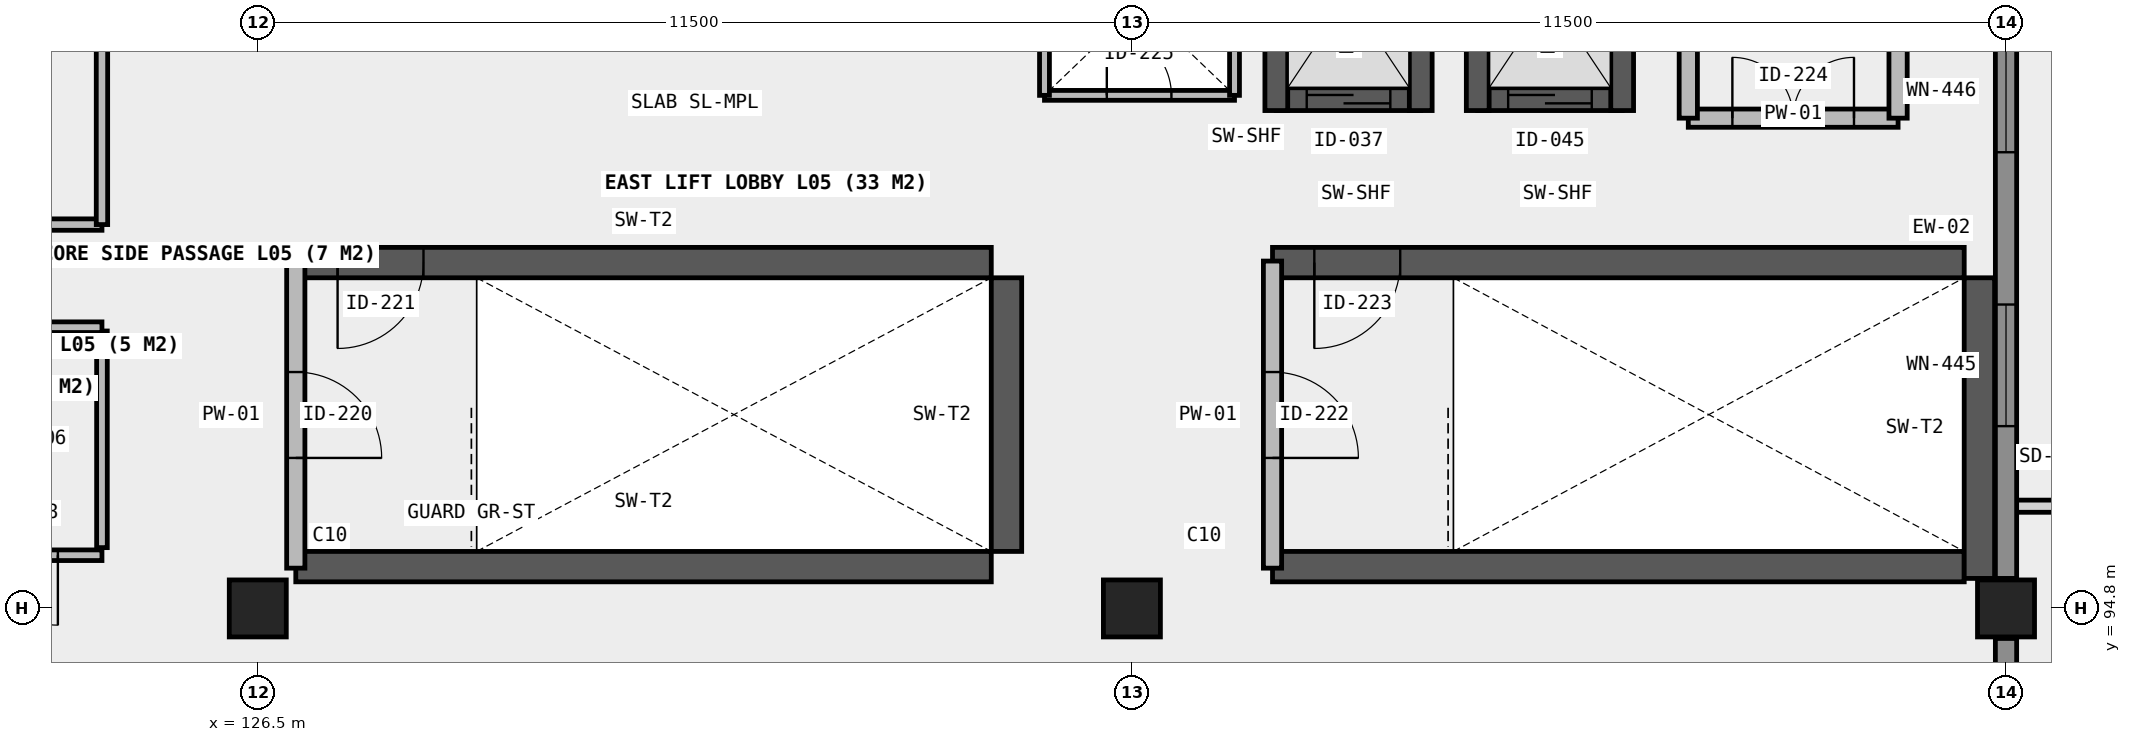
"""IFC4 building model, lengths in metres.
Left out: names, types, materials, properties, quantities, classifications, styles, units other than length and angle.
Written with IfcOpenShell. Run it as: python <this file> out.ifc"""

import sys

from ifc_helpers import new_model, si_unit, direction, frame, frame_2d, origin, origin_2d, place, context, subcontext, project, spatial, rectangle, circle, extrude, element, fill, save


model = new_model("IFC4")
c1 = context("Model", 3, precision=1e-05, world=origin(), true_north=direction((0.0, 1.0)))
c2 = subcontext(c1, "Body", "Model", "MODEL_VIEW")
j1 = project(units=[si_unit("LENGTHUNIT", "METRE"), si_unit("PLANEANGLEUNIT", "RADIAN")], contexts=[c1])
p1 = place(None, origin())
s1 = spatial("IfcSite", under=j1, at=p1, CompositionType="ELEMENT")
p2 = place(p1, origin())
s2 = spatial("IfcBuilding", under=s1, at=p2, CompositionType="ELEMENT")
p3 = place(p2, frame((0.0, 0.0, 22.46)))
s3 = spatial("IfcBuildingStorey", under=s2, at=p3, CompositionType="ELEMENT", Elevation=22.46)
for number, where, z_axis, x_axis in (
    (1, (126.5, 94.8, 0.0), (0.0, 0.0, 1.0), (1.0, 0.0, 0.0)),
    (2, (138.0, 94.8, 0.0), (0.0, 0.0, 1.0), (1.0, 0.0, 0.0)),
    (3, (149.5, 94.8, 0.0), (0.0, 0.0, 1.0), (1.0, 0.0, 0.0)),
):
    element("IfcColumn", number, at=place(p3, frame(where, z_axis=z_axis, x_axis=x_axis)), inside=s3, PredefinedType="COLUMN", context=c2, shape_type="SweptSolid", body=[
        extrude(circle(Radius=0.375, at=origin_2d()), origin(), (0.0, 0.0, 1.0), 4.44),
    ])
p4 = place(p3, frame((139.9, 101.5, 0.0), z_axis=(0.0, 0.0, 1.0), x_axis=(1.0, 0.0, 0.0)))
e4 = element("IfcWall", 4, at=p4, inside=s3, PredefinedType="SHEAR", context=c2, shape_type="SweptSolid", body=[
    extrude(rectangle(XDim=1.9, YDim=0.3, at=frame_2d((0.95, 0.0))), origin(), (0.0, 0.0, 1.0), 4.16),
])
p5 = place(p4, frame((0.4, 0.0, 0.0)))
e5 = element("IfcOpeningElement", 5, at=p5, cuts=e4, PredefinedType="OPENING", context=c2, shape_type="SweptSolid", body=[
    extrude(rectangle(XDim=1.1, YDim=2.15, at=frame_2d((0.55, 1.075))), frame((0.0, 0.16, 0.0), z_axis=(0.0, -1.0, 0.0), x_axis=(1.0, 0.0, 0.0)), (0.0, 0.0, 1.0), 0.32),
])
for number, where, z_axis, x_axis in (
    (6, (139.9, 101.35, 0.0), (0.0, 0.0, 1.0), (0.0, 1.0, 0.0)),
    (7, (141.8, 101.35, 0.0), (0.0, 0.0, 1.0), (0.0, 1.0, 0.0)),
):
    element("IfcWall", number, at=place(p3, frame(where, z_axis=z_axis, x_axis=x_axis)), inside=s3, PredefinedType="SHEAR", context=c2, shape_type="SweptSolid", body=[
        extrude(rectangle(XDim=3.0, YDim=0.3, at=frame_2d((1.5, 0.0))), origin(), (0.0, 0.0, 1.0), 4.16),
    ])
p6 = place(p3, frame((142.55, 101.5, 0.0), z_axis=(0.0, 0.0, 1.0), x_axis=(1.0, 0.0, 0.0)))
e8 = element("IfcWall", 8, at=p6, inside=s3, PredefinedType="SHEAR", context=c2, shape_type="SweptSolid", body=[
    extrude(rectangle(XDim=1.9, YDim=0.3, at=frame_2d((0.95, 0.0))), origin(), (0.0, 0.0, 1.0), 4.16),
])
p7 = place(p6, frame((0.4, 0.0, 0.0)))
e9 = element("IfcOpeningElement", 9, at=p7, cuts=e8, PredefinedType="OPENING", context=c2, shape_type="SweptSolid", body=[
    extrude(rectangle(XDim=1.1, YDim=2.15, at=frame_2d((0.55, 1.075))), frame((0.0, 0.16, 0.0), z_axis=(0.0, -1.0, 0.0), x_axis=(1.0, 0.0, 0.0)), (0.0, 0.0, 1.0), 0.32),
])
for number, where, z_axis, x_axis in (
    (10, (142.55, 101.35, 0.0), (0.0, 0.0, 1.0), (0.0, 1.0, 0.0)),
    (11, (144.45, 101.35, 0.0), (0.0, 0.0, 1.0), (0.0, 1.0, 0.0)),
):
    element("IfcWall", number, at=place(p3, frame(where, z_axis=z_axis, x_axis=x_axis)), inside=s3, PredefinedType="SHEAR", context=c2, shape_type="SweptSolid", body=[
        extrude(rectangle(XDim=3.0, YDim=0.3, at=frame_2d((1.5, 0.0))), origin(), (0.0, 0.0, 1.0), 4.16),
    ])
p8 = place(p3, frame((127.0, 95.35, 0.0), z_axis=(0.0, 0.0, 1.0), x_axis=(1.0, 0.0, 0.0)))
e12 = element("IfcWall", 12, at=p8, inside=s3, PredefinedType="SHEAR", context=c2, shape_type="SweptSolid", body=[
    extrude(rectangle(XDim=9.15, YDim=0.4, at=frame_2d((4.575, 0.0))), origin(), (0.0, 0.0, 1.0), 4.44),
])
p9 = place(p3, frame((127.0, 99.35, 0.0), z_axis=(0.0, 0.0, 1.0), x_axis=(1.0, 0.0, 0.0)))
e13 = element("IfcWall", 13, at=p9, inside=s3, PredefinedType="SHEAR", context=c2, shape_type="SweptSolid", body=[
    extrude(rectangle(XDim=9.15, YDim=0.4, at=frame_2d((4.575, 0.0))), origin(), (0.0, 0.0, 1.0), 4.44),
])
p10 = place(p9, frame((0.55, 0.0, 0.0)))
e14 = element("IfcOpeningElement", 14, at=p10, cuts=e13, PredefinedType="OPENING", context=c2, shape_type="SweptSolid", body=[
    extrude(rectangle(XDim=1.13, YDim=2.15, at=frame_2d((0.565, 1.075))), frame((0.0, 0.21, 0.0), z_axis=(0.0, -1.0, 0.0), x_axis=(1.0, 0.0, 0.0)), (0.0, 0.0, 1.0), 0.42),
])
p11 = place(p3, frame((136.35, 95.55, 0.0), z_axis=(0.0, 0.0, 1.0), x_axis=(0.0, 1.0, 0.0)))
e15 = element("IfcWall", 15, at=p11, inside=s3, PredefinedType="SHEAR", context=c2, shape_type="SweptSolid", body=[
    extrude(rectangle(XDim=3.6, YDim=0.4, at=frame_2d((1.8, 0.0))), origin(), (0.0, 0.0, 1.0), 4.44),
])
p12 = place(p3, frame((139.85, 95.35, 0.0), z_axis=(0.0, 0.0, 1.0), x_axis=(1.0, 0.0, 0.0)))
e16 = element("IfcWall", 16, at=p12, inside=s3, PredefinedType="SHEAR", context=c2, shape_type="SweptSolid", body=[
    extrude(rectangle(XDim=9.1, YDim=0.4, at=frame_2d((4.55, 0.0))), origin(), (0.0, 0.0, 1.0), 4.44),
])
p13 = place(p3, frame((139.85, 99.35, 0.0), z_axis=(0.0, 0.0, 1.0), x_axis=(1.0, 0.0, 0.0)))
e17 = element("IfcWall", 17, at=p13, inside=s3, PredefinedType="SHEAR", context=c2, shape_type="SweptSolid", body=[
    extrude(rectangle(XDim=9.1, YDim=0.4, at=frame_2d((4.55, 0.0))), origin(), (0.0, 0.0, 1.0), 4.44),
])
p14 = place(p13, frame((0.55, 0.0, 0.0)))
e18 = element("IfcOpeningElement", 18, at=p14, cuts=e17, PredefinedType="OPENING", context=c2, shape_type="SweptSolid", body=[
    extrude(rectangle(XDim=1.13, YDim=2.15, at=frame_2d((0.565, 1.075))), frame((0.0, 0.21, 0.0), z_axis=(0.0, -1.0, 0.0), x_axis=(1.0, 0.0, 0.0)), (0.0, 0.0, 1.0), 0.42),
])
p15 = place(p3, frame((149.15, 95.195, 0.0), z_axis=(0.0, 0.0, 1.0), x_axis=(0.0, 1.0, 0.0)))
e19 = element("IfcWall", 19, at=p15, inside=s3, PredefinedType="SHEAR", context=c2, shape_type="SweptSolid", body=[
    extrude(rectangle(XDim=3.955, YDim=0.4, at=frame_2d((1.978, 0.0))), origin(), (0.0, 0.0, 1.0), 4.44),
])
p16 = place(p3, frame((149.5, 86.27, 0.0), z_axis=(0.0, 0.0, 1.0), x_axis=(0.0, 1.0, 0.0)))
e20 = element("IfcWall", 20, at=p16, inside=s3, PredefinedType="SOLIDWALL", context=c2, shape_type="SweptSolid", body=[
    extrude(rectangle(XDim=8.135, YDim=0.28, at=frame_2d((4.067, 0.0))), origin(), (0.0, 0.0, 1.0), 3.36),
])
p17 = place(p16, frame((3.167, 0.0, 0.0)))
e21 = element("IfcOpeningElement", 21, at=p17, cuts=e20, PredefinedType="OPENING", context=c2, shape_type="SweptSolid", body=[
    extrude(rectangle(XDim=1.8, YDim=2.25, at=frame_2d((0.9, 1.125))), frame((0.0, 0.15, 0.0), z_axis=(0.0, -1.0, 0.0), x_axis=(1.0, 0.0, 0.0)), (0.0, 0.0, 1.0), 0.3),
])
p18 = place(p16, frame((0.784, 0.0, 0.78)))
e22 = element("IfcOpeningElement", 22, at=p18, cuts=e20, PredefinedType="OPENING", context=c2, shape_type="SweptSolid", body=[
    extrude(rectangle(XDim=1.6, YDim=1.6, at=frame_2d((0.8, 0.8))), frame((0.0, 0.15, 0.0), z_axis=(0.0, -1.0, 0.0), x_axis=(1.0, 0.0, 0.0)), (0.0, 0.0, 1.0), 0.3),
])
p19 = place(p3, frame((149.5, 95.195, 0.0), z_axis=(0.0, 0.0, 1.0), x_axis=(0.0, 1.0, 0.0)))
e23 = element("IfcWall", 23, at=p19, inside=s3, PredefinedType="SOLIDWALL", context=c2, shape_type="SweptSolid", body=[
    extrude(rectangle(XDim=9.21, YDim=0.28, at=frame_2d((4.605, 0.0))), origin(), (0.0, 0.0, 1.0), 3.36),
])
p20 = place(p19, frame((2.003, 0.0, 0.85)))
e24 = element("IfcOpeningElement", 24, at=p20, cuts=e23, PredefinedType="OPENING", context=c2, shape_type="SweptSolid", body=[
    extrude(rectangle(XDim=1.6, YDim=1.6, at=frame_2d((0.8, 0.8))), frame((0.0, 0.15, 0.0), z_axis=(0.0, -1.0, 0.0), x_axis=(1.0, 0.0, 0.0)), (0.0, 0.0, 1.0), 0.3),
])
p21 = place(p19, frame((5.607, 0.0, 0.85)))
e25 = element("IfcOpeningElement", 25, at=p21, cuts=e23, PredefinedType="OPENING", context=c2, shape_type="SweptSolid", body=[
    extrude(rectangle(XDim=1.6, YDim=1.6, at=frame_2d((0.8, 0.8))), frame((0.0, 0.15, 0.0), z_axis=(0.0, -1.0, 0.0), x_axis=(1.0, 0.0, 0.0)), (0.0, 0.0, 1.0), 0.3),
])
p22 = place(p3, frame((127.0, 95.33, 0.0), z_axis=(0.0, 0.0, 1.0), x_axis=(0.0, 1.0, 0.0)))
e26 = element("IfcWall", 26, at=p22, inside=s3, PredefinedType="SOLIDWALL", context=c2, shape_type="SweptSolid", body=[
    extrude(rectangle(XDim=4.04, YDim=0.24, at=frame_2d((2.02, 0.0))), origin(), (0.0, 0.0, 1.0), 4.14),
])
p23 = place(p22, frame((1.45, 0.0, 0.0)))
e27 = element("IfcOpeningElement", 27, at=p23, cuts=e26, PredefinedType="OPENING", context=c2, shape_type="SweptSolid", body=[
    extrude(rectangle(XDim=1.13, YDim=2.15, at=frame_2d((0.565, 1.075))), frame((0.0, 0.13, 0.0), z_axis=(0.0, -1.0, 0.0), x_axis=(1.0, 0.0, 0.0)), (0.0, 0.0, 1.0), 0.26),
])
p24 = place(p3, frame((139.85, 95.33, 0.0), z_axis=(0.0, 0.0, 1.0), x_axis=(0.0, 1.0, 0.0)))
e28 = element("IfcWall", 28, at=p24, inside=s3, PredefinedType="SOLIDWALL", context=c2, shape_type="SweptSolid", body=[
    extrude(rectangle(XDim=4.04, YDim=0.24, at=frame_2d((2.02, 0.0))), origin(), (0.0, 0.0, 1.0), 4.14),
])
p25 = place(p24, frame((1.45, 0.0, 0.0)))
e29 = element("IfcOpeningElement", 29, at=p25, cuts=e28, PredefinedType="OPENING", context=c2, shape_type="SweptSolid", body=[
    extrude(rectangle(XDim=1.13, YDim=2.15, at=frame_2d((0.565, 1.075))), frame((0.0, 0.13, 0.0), z_axis=(0.0, -1.0, 0.0), x_axis=(1.0, 0.0, 0.0)), (0.0, 0.0, 1.0), 0.26),
])
p26 = place(p3, frame((145.32, 101.25, 0.0), z_axis=(0.0, 0.0, 1.0), x_axis=(1.0, 0.0, 0.0)))
e30 = element("IfcWall", 30, at=p26, inside=s3, PredefinedType="SOLIDWALL", context=c2, shape_type="SweptSolid", body=[
    extrude(rectangle(XDim=2.76, YDim=0.24, at=frame_2d((1.38, 0.0))), origin(), (0.0, 0.0, 1.0), 4.14),
])
p27 = place(p26, frame((0.58, 0.0, 0.0)))
e31 = element("IfcOpeningElement", 31, at=p27, cuts=e30, PredefinedType="OPENING", context=c2, shape_type="SweptSolid", body=[
    extrude(rectangle(XDim=1.6, YDim=2.15, at=frame_2d((0.8, 1.075))), frame((0.0, 0.13, 0.0), z_axis=(0.0, -1.0, 0.0), x_axis=(1.0, 0.0, 0.0)), (0.0, 0.0, 1.0), 0.26),
])
for number, where, z_axis, x_axis in (
    (32, (145.32, 101.25, 0.0), (0.0, 0.0, 1.0), (0.0, 1.0, 0.0)),
    (33, (148.08, 101.25, 0.0), (0.0, 0.0, 1.0), (0.0, 1.0, 0.0)),
):
    element("IfcWall", number, at=place(p3, frame(where, z_axis=z_axis, x_axis=x_axis)), inside=s3, PredefinedType="SOLIDWALL", context=c2, shape_type="SweptSolid", body=[
        extrude(rectangle(XDim=2.6, YDim=0.24, at=frame_2d((1.3, 0.0))), origin(), (0.0, 0.0, 1.0), 4.14),
    ])
p28 = place(p3, frame((136.85, 101.55, 0.0), z_axis=(0.0, 0.0, 1.0), x_axis=(1.0, 0.0, 0.0)))
e34 = element("IfcWall", 34, at=p28, inside=s3, PredefinedType="PLUMBINGWALL", context=c2, shape_type="SweptSolid", body=[
    extrude(rectangle(XDim=2.5, YDim=0.13, at=frame_2d((1.25, 0.0))), origin(), (0.0, 0.0, 1.0), 4.14),
])
p29 = place(p28, frame((0.82, 0.0, 0.0)))
e35 = element("IfcOpeningElement", 35, at=p29, cuts=e34, PredefinedType="OPENING", context=c2, shape_type="SweptSolid", body=[
    extrude(rectangle(XDim=0.85, YDim=2.0, at=frame_2d((0.425, 1.0))), frame((0.0, 0.075, 0.0), z_axis=(0.0, -1.0, 0.0), x_axis=(1.0, 0.0, 0.0)), (0.0, 0.0, 1.0), 0.15),
])
for number, where, z_axis, x_axis in (
    (36, (136.85, 101.55, 0.0), (0.0, 0.0, 1.0), (0.0, 1.0, 0.0)),
    (37, (139.35, 101.55, 0.0), (0.0, 0.0, 1.0), (0.0, 1.0, 0.0)),
):
    element("IfcWall", number, at=place(p3, frame(where, z_axis=z_axis, x_axis=x_axis)), inside=s3, PredefinedType="PLUMBINGWALL", context=c2, shape_type="SweptSolid", body=[
        extrude(rectangle(XDim=2.4, YDim=0.13, at=frame_2d((1.2, 0.0))), origin(), (0.0, 0.0, 1.0), 4.14),
    ])
p30 = place(p3, frame((118.15, 95.5, 0.0), z_axis=(0.0, 0.0, 1.0), x_axis=(1.0, 0.0, 0.0)))
e38 = element("IfcWall", 38, at=p30, inside=s3, PredefinedType="PLUMBINGWALL", context=c2, shape_type="SweptSolid", body=[
    extrude(rectangle(XDim=6.3, YDim=0.14, at=frame_2d((3.15, 0.0))), origin(), (0.0, 0.0, 1.0), 4.14),
])
p31 = place(p30, frame((0.72, 0.0, 0.0)))
e39 = element("IfcOpeningElement", 39, at=p31, cuts=e38, PredefinedType="OPENING", context=c2, shape_type="SweptSolid", body=[
    extrude(rectangle(XDim=0.95, YDim=2.1, at=frame_2d((0.475, 1.05))), frame((0.0, 0.08, 0.0), z_axis=(0.0, -1.0, 0.0), x_axis=(1.0, 0.0, 0.0)), (0.0, 0.0, 1.0), 0.16),
])
p32 = place(p30, frame((2.8, 0.0, 0.0)))
e40 = element("IfcOpeningElement", 40, at=p32, cuts=e38, PredefinedType="OPENING", context=c2, shape_type="SweptSolid", body=[
    extrude(rectangle(XDim=0.92, YDim=2.1, at=frame_2d((0.46, 1.05))), frame((0.0, 0.08, 0.0), z_axis=(0.0, -1.0, 0.0), x_axis=(1.0, 0.0, 0.0)), (0.0, 0.0, 1.0), 0.16),
])
p33 = place(p30, frame((4.8, 0.0, 0.0)))
e41 = element("IfcOpeningElement", 41, at=p33, cuts=e38, PredefinedType="OPENING", context=c2, shape_type="SweptSolid", body=[
    extrude(rectangle(XDim=0.92, YDim=2.1, at=frame_2d((0.46, 1.05))), frame((0.0, 0.08, 0.0), z_axis=(0.0, -1.0, 0.0), x_axis=(1.0, 0.0, 0.0)), (0.0, 0.0, 1.0), 0.16),
])
p34 = place(p3, frame((124.45, 95.6, 0.0), z_axis=(0.0, 0.0, 1.0), x_axis=(0.0, 1.0, 0.0)))
e42 = element("IfcWall", 42, at=p34, inside=s3, PredefinedType="PLUMBINGWALL", context=c2, shape_type="SweptSolid", body=[
    extrude(rectangle(XDim=2.85, YDim=0.14, at=frame_2d((1.425, 0.0))), origin(), (0.0, 0.0, 1.0), 4.14),
])
p35 = place(p3, frame((118.15, 98.5, 0.0), z_axis=(0.0, 0.0, 1.0), x_axis=(1.0, 0.0, 0.0)))
e43 = element("IfcWall", 43, at=p35, inside=s3, PredefinedType="PLUMBINGWALL", context=c2, shape_type="SweptSolid", body=[
    extrude(rectangle(XDim=6.3, YDim=0.14, at=frame_2d((3.15, 0.0))), origin(), (0.0, 0.0, 1.0), 4.14),
])
p36 = place(p3, frame((115.16, 99.85, 0.0), z_axis=(0.0, 0.0, 1.0), x_axis=(1.0, 0.0, 0.0)))
e44 = element("IfcWall", 44, at=p36, inside=s3, PredefinedType="PARTITIONING", context=c2, shape_type="SweptSolid", body=[
    extrude(rectangle(XDim=9.29, YDim=0.15, at=frame_2d((4.645, 0.0))), origin(), (0.0, 0.0, 1.0), 4.14),
])
p37 = place(p36, frame((3.64, 0.0, 0.0)))
e45 = element("IfcOpeningElement", 45, at=p37, cuts=e44, PredefinedType="OPENING", context=c2, shape_type="SweptSolid", body=[
    extrude(rectangle(XDim=1.72, YDim=2.2, at=frame_2d((0.86, 1.1))), frame((0.0, 0.085, 0.0), z_axis=(0.0, -1.0, 0.0), x_axis=(1.0, 0.0, 0.0)), (0.0, 0.0, 1.0), 0.17),
])
p38 = place(p3, frame((124.45, 99.85, 0.0), z_axis=(0.0, 0.0, 1.0), x_axis=(0.0, 1.0, 0.0)))
e46 = element("IfcWall", 46, at=p38, inside=s3, PredefinedType="PARTITIONING", context=c2, shape_type="SweptSolid", body=[
    extrude(rectangle(XDim=14.55, YDim=0.15, at=frame_2d((7.275, 0.0))), origin(), (0.0, 0.0, 1.0), 3.8),
])
p39 = place(p20, origin())
e47 = element("IfcWindow", 47, at=p39, inside=s3, PartitioningType="SINGLE_PANEL", PredefinedType="WINDOW", context=c2, shape_type="SweptSolid", body=[
    extrude(rectangle(XDim=1.6, YDim=1.6, at=frame_2d((0.8, 0.8))), frame((0.0, 0.03, 0.0), z_axis=(0.0, -1.0, 0.0), x_axis=(1.0, 0.0, 0.0)), (0.0, 0.0, 1.0), 0.06),
])
fill(e24, e47)
p40 = place(p21, origin())
e48 = element("IfcWindow", 48, at=p40, inside=s3, PartitioningType="SINGLE_PANEL", PredefinedType="WINDOW", context=c2, shape_type="SweptSolid", body=[
    extrude(rectangle(XDim=1.6, YDim=1.6, at=frame_2d((0.8, 0.8))), frame((0.0, 0.03, 0.0), z_axis=(0.0, -1.0, 0.0), x_axis=(1.0, 0.0, 0.0)), (0.0, 0.0, 1.0), 0.06),
])
fill(e25, e48)
p41 = place(p5, origin())
e49 = element("IfcDoor", 49, at=p41, inside=s3, OperationType="SLIDING_TO_LEFT", PredefinedType="DOOR", context=c2, shape_type="SweptSolid", body=[
    extrude(rectangle(XDim=1.1, YDim=2.15, at=frame_2d((0.55, 1.075))), frame((0.0, 0.025, 0.0), z_axis=(0.0, -1.0, 0.0), x_axis=(1.0, 0.0, 0.0)), (0.0, 0.0, 1.0), 0.05),
])
fill(e5, e49)
p42 = place(p7, origin())
e50 = element("IfcDoor", 50, at=p42, inside=s3, OperationType="SLIDING_TO_LEFT", PredefinedType="DOOR", context=c2, shape_type="SweptSolid", body=[
    extrude(rectangle(XDim=1.1, YDim=2.15, at=frame_2d((0.55, 1.075))), frame((0.0, 0.025, 0.0), z_axis=(0.0, -1.0, 0.0), x_axis=(1.0, 0.0, 0.0)), (0.0, 0.0, 1.0), 0.05),
])
fill(e9, e50)
p43 = place(p23, frame((0.565, 0.0, 0.0), z_axis=(0.0, 0.0, 1.0), x_axis=(-1.0, 0.0, 0.0)))
e51 = element("IfcDoor", 51, at=p43, inside=s3, OperationType="SINGLE_SWING_LEFT", PredefinedType="DOOR", context=c2, shape_type="SweptSolid", body=[
    extrude(rectangle(XDim=1.13, YDim=2.15, at=frame_2d((0.0, 1.075))), frame((0.0, 0.025, 0.0), z_axis=(0.0, -1.0, 0.0), x_axis=(1.0, 0.0, 0.0)), (0.0, 0.0, 1.0), 0.05),
])
fill(e27, e51)
p44 = place(p10, frame((0.565, 0.0, 0.0), z_axis=(0.0, 0.0, 1.0), x_axis=(-1.0, 0.0, 0.0)))
e52 = element("IfcDoor", 52, at=p44, inside=s3, OperationType="SINGLE_SWING_LEFT", PredefinedType="DOOR", context=c2, shape_type="SweptSolid", body=[
    extrude(rectangle(XDim=1.13, YDim=2.15, at=frame_2d((0.0, 1.075))), frame((0.0, 0.025, 0.0), z_axis=(0.0, -1.0, 0.0), x_axis=(1.0, 0.0, 0.0)), (0.0, 0.0, 1.0), 0.05),
])
fill(e14, e52)
p45 = place(p25, frame((0.565, 0.0, 0.0), z_axis=(0.0, 0.0, 1.0), x_axis=(-1.0, 0.0, 0.0)))
e53 = element("IfcDoor", 53, at=p45, inside=s3, OperationType="SINGLE_SWING_LEFT", PredefinedType="DOOR", context=c2, shape_type="SweptSolid", body=[
    extrude(rectangle(XDim=1.13, YDim=2.15, at=frame_2d((0.0, 1.075))), frame((0.0, 0.025, 0.0), z_axis=(0.0, -1.0, 0.0), x_axis=(1.0, 0.0, 0.0)), (0.0, 0.0, 1.0), 0.05),
])
fill(e29, e53)
p46 = place(p14, frame((0.565, 0.0, 0.0), z_axis=(0.0, 0.0, 1.0), x_axis=(-1.0, 0.0, 0.0)))
e54 = element("IfcDoor", 54, at=p46, inside=s3, OperationType="SINGLE_SWING_LEFT", PredefinedType="DOOR", context=c2, shape_type="SweptSolid", body=[
    extrude(rectangle(XDim=1.13, YDim=2.15, at=frame_2d((0.0, 1.075))), frame((0.0, 0.025, 0.0), z_axis=(0.0, -1.0, 0.0), x_axis=(1.0, 0.0, 0.0)), (0.0, 0.0, 1.0), 0.05),
])
fill(e18, e54)
p47 = place(p27, origin())
e55 = element("IfcDoor", 55, at=p47, inside=s3, OperationType="DOUBLE_DOOR_SINGLE_SWING", PredefinedType="DOOR", context=c2, shape_type="SweptSolid", body=[
    extrude(rectangle(XDim=1.6, YDim=2.15, at=frame_2d((0.8, 1.075))), frame((0.0, 0.025, 0.0), z_axis=(0.0, -1.0, 0.0), x_axis=(1.0, 0.0, 0.0)), (0.0, 0.0, 1.0), 0.05),
])
fill(e31, e55)
p48 = place(p29, origin())
e56 = element("IfcDoor", 56, at=p48, inside=s3, OperationType="SINGLE_SWING_LEFT", PredefinedType="TRAPDOOR", context=c2, shape_type="SweptSolid", body=[
    extrude(rectangle(XDim=0.85, YDim=2.0, at=frame_2d((0.425, 1.0))), frame((0.0, 0.025, 0.0), z_axis=(0.0, -1.0, 0.0), x_axis=(1.0, 0.0, 0.0)), (0.0, 0.0, 1.0), 0.05),
])
fill(e35, e56)
p49 = place(p33, origin())
e57 = element("IfcDoor", 57, at=p49, inside=s3, OperationType="SINGLE_SWING_RIGHT", PredefinedType="DOOR", context=c2, shape_type="SweptSolid", body=[
    extrude(rectangle(XDim=0.92, YDim=2.1, at=frame_2d((0.46, 1.05))), frame((0.0, 0.025, 0.0), z_axis=(0.0, -1.0, 0.0), x_axis=(1.0, 0.0, 0.0)), (0.0, 0.0, 1.0), 0.05),
])
fill(e41, e57)
save(model, sys.argv[1])
